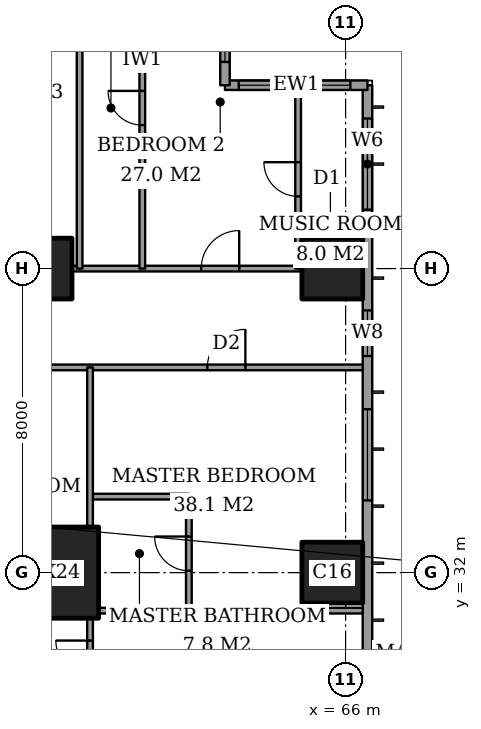
"""IFC4 building model, lengths in metres.
Left out: names, types, materials, properties, quantities, classifications, styles, units other than length and angle.
Written with IfcOpenShell. Run it as: python <this file> out.ifc"""

import sys

from ifc_helpers import new_model, si_unit, direction, frame, frame_2d, origin, origin_2d, place, context, subcontext, project, spatial, rectangle, extrude, element, fill, save


model = new_model("IFC4")
c1 = context("Model", 3, precision=1e-05, world=origin(), true_north=direction((0.0, 1.0)))
c2 = subcontext(c1, "Body", "Model", "MODEL_VIEW")
j1 = project(units=[si_unit("LENGTHUNIT", "METRE"), si_unit("PLANEANGLEUNIT", "RADIAN")], contexts=[c1])
p1 = place(None, origin())
s1 = spatial("IfcSite", under=j1, at=p1, CompositionType="ELEMENT")
p2 = place(p1, origin())
s2 = spatial("IfcBuilding", under=s1, at=p2, CompositionType="ELEMENT")
p3 = place(p2, frame((0.0, 0.0, 230.4)))
s3 = spatial("IfcBuildingStorey", under=s2, at=p3, CompositionType="ELEMENT", Elevation=230.4)
p4 = place(p3, frame((58.0, 32.0, 0.0), z_axis=(0.0, 0.0, 1.0), x_axis=(1.0, 0.0, 0.0)))
e1 = element("IfcColumn", 1, at=p4, inside=s3, PredefinedType="COLUMN", context=c2, shape_type="SweptSolid", body=[
    extrude(rectangle(XDim=3.0, YDim=2.4, at=origin_2d()), origin(), (0.0, 0.0, 1.0), 3.6),
])
for number, where, z_axis, x_axis in (
    (2, (58.0, 40.0, 0.0), (0.0, 0.0, 1.0), (1.0, 0.0, 0.0)),
    (3, (65.65, 32.0, 0.0), (0.0, 0.0, 1.0), (1.0, 0.0, 0.0)),
    (4, (65.65, 40.0, 0.0), (0.0, 0.0, 1.0), (1.0, 0.0, 0.0)),
):
    element("IfcColumn", number, at=place(p3, frame(where, z_axis=z_axis, x_axis=x_axis)), inside=s3, PredefinedType="COLUMN", context=c2, shape_type="SweptSolid", body=[
        extrude(rectangle(XDim=1.6, YDim=1.6, at=origin_2d()), origin(), (0.0, 0.0, 1.0), 3.6),
    ])
p5 = place(p3, frame((66.575, 3.175, 0.0), z_axis=(0.0, 0.0, 1.0), x_axis=(0.0, 1.0, 0.0)))
e5 = element("IfcWall", 5, at=p5, inside=s3, PredefinedType="SOLIDWALL", context=c2, shape_type="SweptSolid", body=[
    extrude(rectangle(XDim=41.65, YDim=0.25, at=frame_2d((20.825, 0.0))), origin(), (0.0, 0.0, 1.0), 3.6),
])
p6 = place(p5, frame((0.875, 0.0, 0.6)))
e6 = element("IfcOpeningElement", 6, at=p6, cuts=e5, PredefinedType="OPENING", context=c2, shape_type="SweptSolid", body=[
    extrude(rectangle(XDim=2.4, YDim=2.0, at=frame_2d((1.2, 1.0))), frame((0.0, 0.135, 0.0), z_axis=(0.0, -1.0, 0.0), x_axis=(1.0, 0.0, 0.0)), (0.0, 0.0, 1.0), 0.27),
])
p7 = place(p5, frame((6.225, 0.0, 0.6)))
e7 = element("IfcOpeningElement", 7, at=p7, cuts=e5, PredefinedType="OPENING", context=c2, shape_type="SweptSolid", body=[
    extrude(rectangle(XDim=1.2, YDim=2.0, at=frame_2d((0.6, 1.0))), frame((0.0, 0.135, 0.0), z_axis=(0.0, -1.0, 0.0), x_axis=(1.0, 0.0, 0.0)), (0.0, 0.0, 1.0), 0.27),
])
p8 = place(p5, frame((8.725, 0.0, 0.6)))
e8 = element("IfcOpeningElement", 8, at=p8, cuts=e5, PredefinedType="OPENING", context=c2, shape_type="SweptSolid", body=[
    extrude(rectangle(XDim=2.4, YDim=2.0, at=frame_2d((1.2, 1.0))), frame((0.0, 0.135, 0.0), z_axis=(0.0, -1.0, 0.0), x_axis=(1.0, 0.0, 0.0)), (0.0, 0.0, 1.0), 0.27),
])
p9 = place(p5, frame((15.725, 0.0, 0.6)))
e9 = element("IfcOpeningElement", 9, at=p9, cuts=e5, PredefinedType="OPENING", context=c2, shape_type="SweptSolid", body=[
    extrude(rectangle(XDim=2.4, YDim=2.0, at=frame_2d((1.2, 1.0))), frame((0.0, 0.135, 0.0), z_axis=(0.0, -1.0, 0.0), x_axis=(1.0, 0.0, 0.0)), (0.0, 0.0, 1.0), 0.27),
])
p10 = place(p5, frame((23.525, 0.0, 0.6)))
e10 = element("IfcOpeningElement", 10, at=p10, cuts=e5, PredefinedType="OPENING", context=c2, shape_type="SweptSolid", body=[
    extrude(rectangle(XDim=2.4, YDim=2.0, at=frame_2d((1.2, 1.0))), frame((0.0, 0.135, 0.0), z_axis=(0.0, -1.0, 0.0), x_axis=(1.0, 0.0, 0.0)), (0.0, 0.0, 1.0), 0.27),
])
p11 = place(p5, frame((30.725, 0.0, 0.6)))
e11 = element("IfcOpeningElement", 11, at=p11, cuts=e5, PredefinedType="OPENING", context=c2, shape_type="SweptSolid", body=[
    extrude(rectangle(XDim=2.4, YDim=2.0, at=frame_2d((1.2, 1.0))), frame((0.0, 0.135, 0.0), z_axis=(0.0, -1.0, 0.0), x_axis=(1.0, 0.0, 0.0)), (0.0, 0.0, 1.0), 0.27),
])
p12 = place(p5, frame((34.525, 0.0, 0.6)))
e12 = element("IfcOpeningElement", 12, at=p12, cuts=e5, PredefinedType="OPENING", context=c2, shape_type="SweptSolid", body=[
    extrude(rectangle(XDim=1.2, YDim=2.0, at=frame_2d((0.6, 1.0))), frame((0.0, 0.135, 0.0), z_axis=(0.0, -1.0, 0.0), x_axis=(1.0, 0.0, 0.0)), (0.0, 0.0, 1.0), 0.27),
])
p13 = place(p5, frame((38.375, 0.0, 0.6)))
e13 = element("IfcOpeningElement", 13, at=p13, cuts=e5, PredefinedType="OPENING", context=c2, shape_type="SweptSolid", body=[
    extrude(rectangle(XDim=2.4, YDim=2.0, at=frame_2d((1.2, 1.0))), frame((0.0, 0.135, 0.0), z_axis=(0.0, -1.0, 0.0), x_axis=(1.0, 0.0, 0.0)), (0.0, 0.0, 1.0), 0.27),
])
p14 = place(p3, frame((66.575, 44.825, 0.0), z_axis=(0.0, 0.0, 1.0), x_axis=(-1.0, 0.0, 0.0)))
e14 = element("IfcWall", 14, at=p14, inside=s3, PredefinedType="SOLIDWALL", context=c2, shape_type="SweptSolid", body=[
    extrude(rectangle(XDim=3.75, YDim=0.25, at=frame_2d((1.875, 0.0))), origin(), (0.0, 0.0, 1.0), 3.6),
])
p15 = place(p14, frame((0.45, 0.0, 0.6)))
e15 = element("IfcOpeningElement", 15, at=p15, cuts=e14, PredefinedType="OPENING", context=c2, shape_type="SweptSolid", body=[
    extrude(rectangle(XDim=1.2, YDim=2.0, at=frame_2d((0.6, 1.0))), frame((0.0, 0.135, 0.0), z_axis=(0.0, -1.0, 0.0), x_axis=(1.0, 0.0, 0.0)), (0.0, 0.0, 1.0), 0.27),
])
p16 = place(p14, frame((2.188, 0.0, 0.6)))
e16 = element("IfcOpeningElement", 16, at=p16, cuts=e14, PredefinedType="OPENING", context=c2, shape_type="SweptSolid", body=[
    extrude(rectangle(XDim=1.2, YDim=2.0, at=frame_2d((0.6, 1.0))), frame((0.0, 0.135, 0.0), z_axis=(0.0, -1.0, 0.0), x_axis=(1.0, 0.0, 0.0)), (0.0, 0.0, 1.0), 0.27),
])
p17 = place(p3, frame((62.825, 44.825, 0.0), z_axis=(0.0, 0.0, 1.0), x_axis=(0.0, 1.0, 0.0)))
e17 = element("IfcWall", 17, at=p17, inside=s3, PredefinedType="SOLIDWALL", context=c2, shape_type="SweptSolid", body=[
    extrude(rectangle(XDim=3.75, YDim=0.25, at=frame_2d((1.875, 0.0))), origin(), (0.0, 0.0, 1.0), 3.6),
])
p18 = place(p17, frame((0.613, 0.0, 0.6)))
e18 = element("IfcOpeningElement", 18, at=p18, cuts=e17, PredefinedType="OPENING", context=c2, shape_type="SweptSolid", body=[
    extrude(rectangle(XDim=2.4, YDim=2.0, at=frame_2d((1.2, 1.0))), frame((0.0, 0.135, 0.0), z_axis=(0.0, -1.0, 0.0), x_axis=(1.0, 0.0, 0.0)), (0.0, 0.0, 1.0), 0.27),
])
p19 = place(p3, frame((59.5, 31.0, 0.0), z_axis=(0.0, 0.0, 1.0), x_axis=(1.0, 0.0, 0.0)))
e19 = element("IfcWall", 19, at=p19, inside=s3, PredefinedType="PARTITIONING", context=c2, shape_type="SweptSolid", body=[
    extrude(rectangle(XDim=6.95, YDim=0.15, at=frame_2d((3.475, 0.0))), origin(), (0.0, 0.0, 1.0), 3.35),
])
p20 = place(p3, frame((59.275, 34.0, 0.0), z_axis=(0.0, 0.0, 1.0), x_axis=(1.0, 0.0, 0.0)))
e20 = element("IfcWall", 20, at=p20, inside=s3, PredefinedType="PARTITIONING", context=c2, shape_type="SweptSolid", body=[
    extrude(rectangle(XDim=2.6, YDim=0.15, at=frame_2d((1.3, 0.0))), origin(), (0.0, 0.0, 1.0), 3.35),
])
p21 = place(p3, frame((41.439, 37.4, 0.0), z_axis=(0.0, 0.0, 1.0), x_axis=(1.0, 0.0, 0.0)))
e21 = element("IfcWall", 21, at=p21, inside=s3, PredefinedType="PARTITIONING", context=c2, shape_type="SweptSolid", body=[
    extrude(rectangle(XDim=25.011, YDim=0.15, at=frame_2d((12.505, 0.0))), origin(), (0.0, 0.0, 1.0), 3.35),
])
p22 = place(p21, frame((10.761, 0.0, 0.0)))
e22 = element("IfcOpeningElement", 22, at=p22, cuts=e21, PredefinedType="OPENING", context=c2, shape_type="SweptSolid", body=[
    extrude(rectangle(XDim=1.0, YDim=2.1, at=frame_2d((0.5, 1.05))), frame((0.0, 0.085, 0.0), z_axis=(0.0, -1.0, 0.0), x_axis=(1.0, 0.0, 0.0)), (0.0, 0.0, 1.0), 0.17),
])
p23 = place(p21, frame((20.924, 0.0, 0.0)))
e23 = element("IfcOpeningElement", 23, at=p23, cuts=e21, PredefinedType="OPENING", context=c2, shape_type="SweptSolid", body=[
    extrude(rectangle(XDim=1.0, YDim=2.1, at=frame_2d((0.5, 1.05))), frame((0.0, 0.085, 0.0), z_axis=(0.0, -1.0, 0.0), x_axis=(1.0, 0.0, 0.0)), (0.0, 0.0, 1.0), 0.17),
])
p24 = place(p21, frame((15.749, 0.0, 0.0)))
e24 = element("IfcOpeningElement", 24, at=p24, cuts=e21, PredefinedType="OPENING", context=c2, shape_type="SweptSolid", body=[
    extrude(rectangle(XDim=0.9, YDim=2.1, at=frame_2d((0.45, 1.05))), frame((0.0, 0.085, 0.0), z_axis=(0.0, -1.0, 0.0), x_axis=(1.0, 0.0, 0.0)), (0.0, 0.0, 1.0), 0.17),
])
p25 = place(p21, frame((12.961, 0.0, 0.0)))
e25 = element("IfcOpeningElement", 25, at=p25, cuts=e21, PredefinedType="OPENING", context=c2, shape_type="SweptSolid", body=[
    extrude(rectangle(XDim=1.0, YDim=2.1, at=frame_2d((0.5, 1.05))), frame((0.0, 0.085, 0.0), z_axis=(0.0, -1.0, 0.0), x_axis=(1.0, 0.0, 0.0)), (0.0, 0.0, 1.0), 0.17),
])
p26 = place(p21, frame((7.911, 0.0, 0.0)))
e26 = element("IfcOpeningElement", 26, at=p26, cuts=e21, PredefinedType="OPENING", context=c2, shape_type="SweptSolid", body=[
    extrude(rectangle(XDim=0.9, YDim=2.1, at=frame_2d((0.45, 1.05))), frame((0.0, 0.085, 0.0), z_axis=(0.0, -1.0, 0.0), x_axis=(1.0, 0.0, 0.0)), (0.0, 0.0, 1.0), 0.17),
])
p27 = place(p21, frame((2.836, 0.0, 0.0)))
e27 = element("IfcOpeningElement", 27, at=p27, cuts=e21, PredefinedType="OPENING", context=c2, shape_type="SweptSolid", body=[
    extrude(rectangle(XDim=1.0, YDim=2.1, at=frame_2d((0.5, 1.05))), frame((0.0, 0.085, 0.0), z_axis=(0.0, -1.0, 0.0), x_axis=(1.0, 0.0, 0.0)), (0.0, 0.0, 1.0), 0.17),
])
p28 = place(p3, frame((58.8, 40.0, 0.0), z_axis=(0.0, 0.0, 1.0), x_axis=(1.0, 0.0, 0.0)))
e28 = element("IfcWall", 28, at=p28, inside=s3, PredefinedType="PARTITIONING", context=c2, shape_type="SweptSolid", body=[
    extrude(rectangle(XDim=6.05, YDim=0.15, at=frame_2d((3.025, 0.0))), origin(), (0.0, 0.0, 1.0), 3.35),
])
p29 = place(p28, frame((3.4, 0.0, 0.0)))
e29 = element("IfcOpeningElement", 29, at=p29, cuts=e28, PredefinedType="OPENING", context=c2, shape_type="SweptSolid", body=[
    extrude(rectangle(XDim=1.0, YDim=2.1, at=frame_2d((0.5, 1.05))), frame((0.0, 0.085, 0.0), z_axis=(0.0, -1.0, 0.0), x_axis=(1.0, 0.0, 0.0)), (0.0, 0.0, 1.0), 0.17),
])
p30 = place(p3, frame((59.0, 40.0, 0.0), z_axis=(0.0, 0.0, 1.0), x_axis=(0.0, 1.0, 0.0)))
e30 = element("IfcWall", 30, at=p30, inside=s3, PredefinedType="PARTITIONING", context=c2, shape_type="SweptSolid", body=[
    extrude(rectangle(XDim=8.45, YDim=0.15, at=frame_2d((4.225, 0.0))), origin(), (0.0, 0.0, 1.0), 3.35),
])
p31 = place(p3, frame((59.275, 28.35, 0.0), z_axis=(0.0, 0.0, 1.0), x_axis=(0.0, 1.0, 0.0)))
e31 = element("IfcWall", 31, at=p31, inside=s3, PredefinedType="PARTITIONING", context=c2, shape_type="SweptSolid", body=[
    extrude(rectangle(XDim=2.45, YDim=0.15, at=frame_2d((1.225, 0.0))), origin(), (0.0, 0.0, 1.0), 3.35),
])
p32 = place(p31, frame((0.962, 0.0, 0.0)))
e32 = element("IfcOpeningElement", 32, at=p32, cuts=e31, PredefinedType="OPENING", context=c2, shape_type="SweptSolid", body=[
    extrude(rectangle(XDim=0.9, YDim=2.1, at=frame_2d((0.45, 1.05))), frame((0.0, 0.085, 0.0), z_axis=(0.0, -1.0, 0.0), x_axis=(1.0, 0.0, 0.0)), (0.0, 0.0, 1.0), 0.17),
])
p33 = place(p3, frame((59.275, 33.2, 0.0), z_axis=(0.0, 0.0, 1.0), x_axis=(0.0, 1.0, 0.0)))
e33 = element("IfcWall", 33, at=p33, inside=s3, PredefinedType="PARTITIONING", context=c2, shape_type="SweptSolid", body=[
    extrude(rectangle(XDim=4.2, YDim=0.15, at=frame_2d((2.1, 0.0))), origin(), (0.0, 0.0, 1.0), 3.35),
])
p34 = place(p3, frame((60.65, 40.0, 0.0), z_axis=(0.0, 0.0, 1.0), x_axis=(0.0, 1.0, 0.0)))
e34 = element("IfcWall", 34, at=p34, inside=s3, PredefinedType="PARTITIONING", context=c2, shape_type="SweptSolid", body=[
    extrude(rectangle(XDim=8.45, YDim=0.15, at=frame_2d((4.225, 0.0))), origin(), (0.0, 0.0, 1.0), 3.35),
])
p35 = place(p34, frame((3.775, 0.0, 0.0)))
e35 = element("IfcOpeningElement", 35, at=p35, cuts=e34, PredefinedType="OPENING", context=c2, shape_type="SweptSolid", body=[
    extrude(rectangle(XDim=0.9, YDim=2.1, at=frame_2d((0.45, 1.05))), frame((0.0, 0.085, 0.0), z_axis=(0.0, -1.0, 0.0), x_axis=(1.0, 0.0, 0.0)), (0.0, 0.0, 1.0), 0.17),
])
p36 = place(p3, frame((61.875, 31.0, 0.0), z_axis=(0.0, 0.0, 1.0), x_axis=(0.0, 1.0, 0.0)))
e36 = element("IfcWall", 36, at=p36, inside=s3, PredefinedType="PARTITIONING", context=c2, shape_type="SweptSolid", body=[
    extrude(rectangle(XDim=3.0, YDim=0.15, at=frame_2d((1.5, 0.0))), origin(), (0.0, 0.0, 1.0), 3.35),
])
p37 = place(p36, frame((1.05, 0.0, 0.0)))
e37 = element("IfcOpeningElement", 37, at=p37, cuts=e36, PredefinedType="OPENING", context=c2, shape_type="SweptSolid", body=[
    extrude(rectangle(XDim=0.9, YDim=2.1, at=frame_2d((0.45, 1.05))), frame((0.0, 0.085, 0.0), z_axis=(0.0, -1.0, 0.0), x_axis=(1.0, 0.0, 0.0)), (0.0, 0.0, 1.0), 0.17),
])
p38 = place(p3, frame((64.75, 40.0, 0.0), z_axis=(0.0, 0.0, 1.0), x_axis=(0.0, 1.0, 0.0)))
e38 = element("IfcWall", 38, at=p38, inside=s3, PredefinedType="PARTITIONING", context=c2, shape_type="SweptSolid", body=[
    extrude(rectangle(XDim=4.7, YDim=0.15, at=frame_2d((2.35, 0.0))), origin(), (0.0, 0.0, 1.0), 3.35),
])
p39 = place(p38, frame((1.9, 0.0, 0.0)))
e39 = element("IfcOpeningElement", 39, at=p39, cuts=e38, PredefinedType="OPENING", context=c2, shape_type="SweptSolid", body=[
    extrude(rectangle(XDim=0.9, YDim=2.1, at=frame_2d((0.45, 1.05))), frame((0.0, 0.085, 0.0), z_axis=(0.0, -1.0, 0.0), x_axis=(1.0, 0.0, 0.0)), (0.0, 0.0, 1.0), 0.17),
])
p40 = place(p11, origin())
e40 = element("IfcWindow", 40, at=p40, inside=s3, PartitioningType="SINGLE_PANEL", PredefinedType="WINDOW", context=c2, shape_type="SweptSolid", body=[
    extrude(rectangle(XDim=2.4, YDim=2.0, at=frame_2d((1.2, 1.0))), frame((0.0, 0.03, 0.0), z_axis=(0.0, -1.0, 0.0), x_axis=(1.0, 0.0, 0.0)), (0.0, 0.0, 1.0), 0.06),
])
fill(e11, e40)
p41 = place(p12, origin())
e41 = element("IfcWindow", 41, at=p41, inside=s3, PartitioningType="SINGLE_PANEL", PredefinedType="WINDOW", context=c2, shape_type="SweptSolid", body=[
    extrude(rectangle(XDim=1.2, YDim=2.0, at=frame_2d((0.6, 1.0))), frame((0.0, 0.03, 0.0), z_axis=(0.0, -1.0, 0.0), x_axis=(1.0, 0.0, 0.0)), (0.0, 0.0, 1.0), 0.06),
])
fill(e12, e41)
p42 = place(p13, origin())
e42 = element("IfcWindow", 42, at=p42, inside=s3, PartitioningType="SINGLE_PANEL", PredefinedType="WINDOW", context=c2, shape_type="SweptSolid", body=[
    extrude(rectangle(XDim=2.4, YDim=2.0, at=frame_2d((1.2, 1.0))), frame((0.0, 0.03, 0.0), z_axis=(0.0, -1.0, 0.0), x_axis=(1.0, 0.0, 0.0)), (0.0, 0.0, 1.0), 0.06),
])
fill(e13, e42)
p43 = place(p15, origin())
e43 = element("IfcWindow", 43, at=p43, inside=s3, PartitioningType="SINGLE_PANEL", PredefinedType="WINDOW", context=c2, shape_type="SweptSolid", body=[
    extrude(rectangle(XDim=1.2, YDim=2.0, at=frame_2d((0.6, 1.0))), frame((0.0, 0.03, 0.0), z_axis=(0.0, -1.0, 0.0), x_axis=(1.0, 0.0, 0.0)), (0.0, 0.0, 1.0), 0.06),
])
fill(e15, e43)
p44 = place(p16, origin())
e44 = element("IfcWindow", 44, at=p44, inside=s3, PartitioningType="SINGLE_PANEL", PredefinedType="WINDOW", context=c2, shape_type="SweptSolid", body=[
    extrude(rectangle(XDim=1.2, YDim=2.0, at=frame_2d((0.6, 1.0))), frame((0.0, 0.03, 0.0), z_axis=(0.0, -1.0, 0.0), x_axis=(1.0, 0.0, 0.0)), (0.0, 0.0, 1.0), 0.06),
])
fill(e16, e44)
p45 = place(p18, origin())
e45 = element("IfcWindow", 45, at=p45, inside=s3, PartitioningType="SINGLE_PANEL", PredefinedType="WINDOW", context=c2, shape_type="SweptSolid", body=[
    extrude(rectangle(XDim=2.4, YDim=2.0, at=frame_2d((1.2, 1.0))), frame((0.0, 0.03, 0.0), z_axis=(0.0, -1.0, 0.0), x_axis=(1.0, 0.0, 0.0)), (0.0, 0.0, 1.0), 0.06),
])
fill(e18, e45)
p46 = place(p39, origin())
e46 = element("IfcDoor", 46, at=p46, inside=s3, OperationType="SINGLE_SWING_LEFT", PredefinedType="DOOR", context=c2, shape_type="SweptSolid", body=[
    extrude(rectangle(XDim=0.9, YDim=2.1, at=frame_2d((0.45, 1.05))), frame((0.0, 0.025, 0.0), z_axis=(0.0, -1.0, 0.0), x_axis=(1.0, 0.0, 0.0)), (0.0, 0.0, 1.0), 0.05),
])
fill(e39, e46)
p47 = place(p29, origin())
e47 = element("IfcDoor", 47, at=p47, inside=s3, OperationType="SINGLE_SWING_LEFT", PredefinedType="DOOR", context=c2, shape_type="SweptSolid", body=[
    extrude(rectangle(XDim=1.0, YDim=2.1, at=frame_2d((0.5, 1.05))), frame((0.0, 0.025, 0.0), z_axis=(0.0, -1.0, 0.0), x_axis=(1.0, 0.0, 0.0)), (0.0, 0.0, 1.0), 0.05),
])
fill(e29, e47)
p48 = place(p35, origin())
e48 = element("IfcDoor", 48, at=p48, inside=s3, OperationType="SINGLE_SWING_LEFT", PredefinedType="DOOR", context=c2, shape_type="SweptSolid", body=[
    extrude(rectangle(XDim=0.9, YDim=2.1, at=frame_2d((0.45, 1.05))), frame((0.0, 0.025, 0.0), z_axis=(0.0, -1.0, 0.0), x_axis=(1.0, 0.0, 0.0)), (0.0, 0.0, 1.0), 0.05),
])
fill(e35, e48)
p49 = place(p37, origin())
e49 = element("IfcDoor", 49, at=p49, inside=s3, OperationType="SINGLE_SWING_LEFT", PredefinedType="DOOR", context=c2, shape_type="SweptSolid", body=[
    extrude(rectangle(XDim=0.9, YDim=2.1, at=frame_2d((0.45, 1.05))), frame((0.0, 0.025, 0.0), z_axis=(0.0, -1.0, 0.0), x_axis=(1.0, 0.0, 0.0)), (0.0, 0.0, 1.0), 0.05),
])
fill(e37, e49)
p50 = place(p23, origin())
e50 = element("IfcDoor", 50, at=p50, inside=s3, OperationType="SINGLE_SWING_LEFT", PredefinedType="DOOR", context=c2, shape_type="SweptSolid", body=[
    extrude(rectangle(XDim=1.0, YDim=2.1, at=frame_2d((0.5, 1.05))), frame((0.0, 0.025, 0.0), z_axis=(0.0, -1.0, 0.0), x_axis=(1.0, 0.0, 0.0)), (0.0, 0.0, 1.0), 0.05),
])
fill(e23, e50)
p51 = place(p32, origin())
e51 = element("IfcDoor", 51, at=p51, inside=s3, OperationType="SINGLE_SWING_LEFT", PredefinedType="DOOR", context=c2, shape_type="SweptSolid", body=[
    extrude(rectangle(XDim=0.9, YDim=2.1, at=frame_2d((0.45, 1.05))), frame((0.0, 0.025, 0.0), z_axis=(0.0, -1.0, 0.0), x_axis=(1.0, 0.0, 0.0)), (0.0, 0.0, 1.0), 0.05),
])
fill(e32, e51)
save(model, sys.argv[1])
